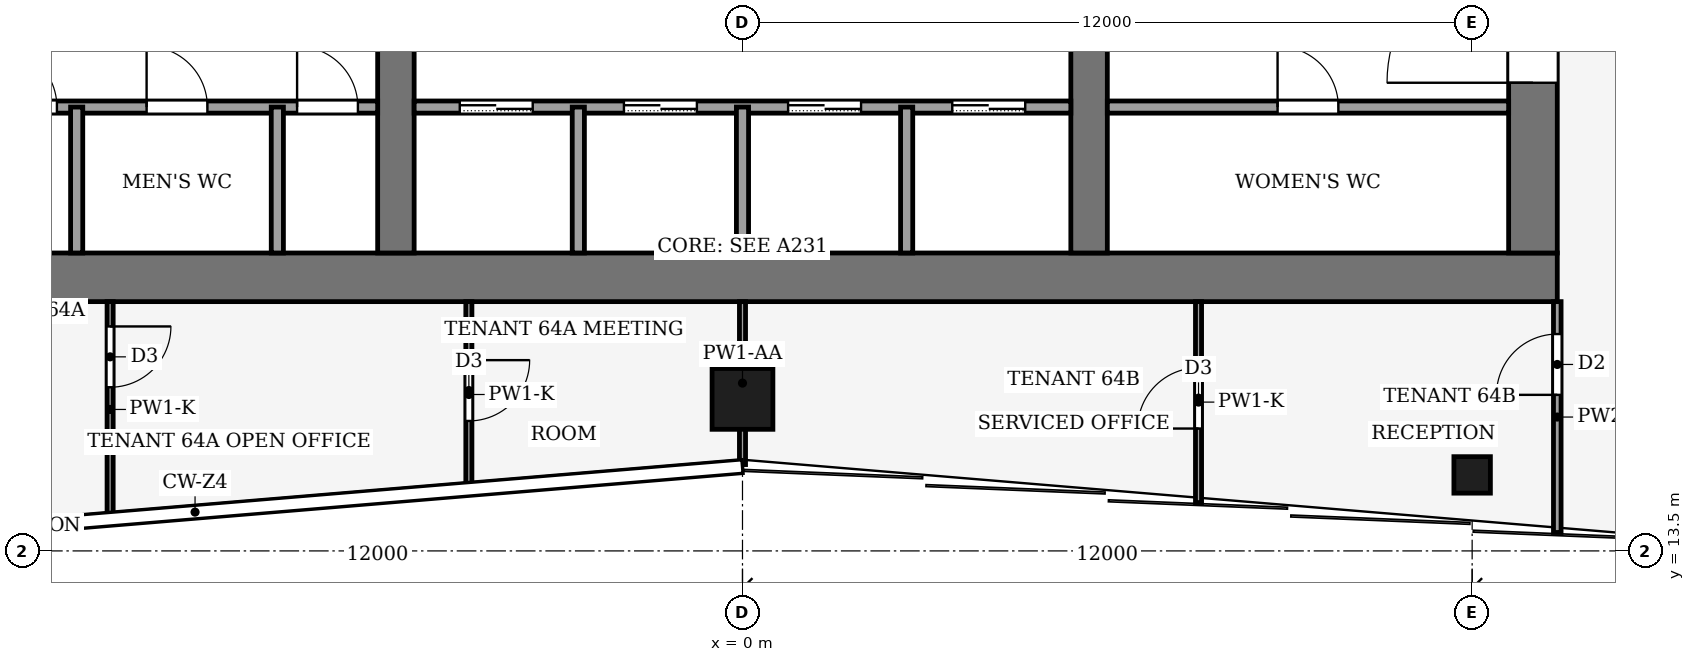
"""IFC4 building model, lengths in metres.
Left out: names, types, materials, properties, quantities, classifications, styles, units other than length and angle.
Written with IfcOpenShell. Run it as: python <this file> out.ifc"""

import sys

from ifc_helpers import new_model, si_unit, direction, frame, frame_2d, origin, origin_2d, place, context, subcontext, project, spatial, rectangle, hollow_rectangle, extrude, element, fill, save


model = new_model("IFC4")
c1 = context("Model", 3, precision=1e-05, world=origin(), true_north=direction((0.0, 1.0)))
c2 = subcontext(c1, "Body", "Model", "MODEL_VIEW")
j1 = project(units=[si_unit("LENGTHUNIT", "METRE"), si_unit("PLANEANGLEUNIT", "RADIAN")], contexts=[c1])
p1 = place(None, origin())
s1 = spatial("IfcSite", under=j1, at=p1, CompositionType="ELEMENT")
p2 = place(p1, origin())
s2 = spatial("IfcBuilding", under=s1, at=p2, CompositionType="ELEMENT")
p3 = place(p2, frame((0.0, 0.0, 278.0)))
s3 = spatial("IfcBuildingStorey", under=s2, at=p3, CompositionType="ELEMENT", Elevation=278.0)
p4 = place(p3, frame((-13.4, 18.0, -0.13), z_axis=(0.0, 0.0, 1.0), x_axis=(1.0, 0.0, 0.0)))
e1 = element("IfcWall", 1, at=p4, inside=s3, PredefinedType="SHEAR", context=c2, shape_type="SweptSolid", body=[
    extrude(rectangle(XDim=26.8, YDim=0.8, at=frame_2d((13.4, 0.0))), origin(), (0.0, 0.0, 1.0), 3.88),
])
p5 = place(p3, frame((13.0, 18.4, -0.13), z_axis=(0.0, 0.0, 1.0), x_axis=(0.0, 1.0, 0.0)))
e2 = element("IfcWall", 2, at=p5, inside=s3, PredefinedType="SHEAR", context=c2, shape_type="SweptSolid", body=[
    extrude(rectangle(XDim=19.2, YDim=0.8, at=frame_2d((9.6, 0.0))), origin(), (0.0, 0.0, 1.0), 3.88),
])
p6 = place(p5, frame((2.8, 0.0, 0.13)))
e3 = element("IfcOpeningElement", 3, at=p6, cuts=e2, PredefinedType="OPENING", context=c2, shape_type="SweptSolid", body=[
    extrude(rectangle(XDim=2.4, YDim=2.4, at=frame_2d((1.2, 1.2))), frame((0.0, 0.41, 0.0), z_axis=(0.0, -1.0, 0.0), x_axis=(1.0, 0.0, 0.0)), (0.0, 0.0, 1.0), 0.82),
])
p7 = place(p5, frame((13.3, 0.0, 0.13)))
e4 = element("IfcOpeningElement", 4, at=p7, cuts=e2, PredefinedType="OPENING", context=c2, shape_type="SweptSolid", body=[
    extrude(rectangle(XDim=2.4, YDim=2.4, at=frame_2d((1.2, 1.2))), frame((0.0, 0.41, 0.0), z_axis=(0.0, -1.0, 0.0), x_axis=(1.0, 0.0, 0.0)), (0.0, 0.0, 1.0), 0.82),
])
p8 = place(p3, frame((-5.7, 18.4, -0.13), z_axis=(0.0, 0.0, 1.0), x_axis=(0.0, 1.0, 0.0)))
e5 = element("IfcWall", 5, at=p8, inside=s3, PredefinedType="SHEAR", context=c2, shape_type="SweptSolid", body=[
    extrude(rectangle(XDim=19.2, YDim=0.6, at=frame_2d((9.6, 0.0))), origin(), (0.0, 0.0, 1.0), 3.88),
])
p9 = place(p8, frame((8.35, 0.0, 0.13)))
e6 = element("IfcOpeningElement", 6, at=p9, cuts=e5, PredefinedType="OPENING", context=c2, shape_type="SweptSolid", body=[
    extrude(rectangle(XDim=0.9, YDim=2.1, at=frame_2d((0.45, 1.05))), frame((0.0, 0.31, 0.0), z_axis=(0.0, -1.0, 0.0), x_axis=(1.0, 0.0, 0.0)), (0.0, 0.0, 1.0), 0.62),
])
p10 = place(p3, frame((5.7, 18.4, -0.13), z_axis=(0.0, 0.0, 1.0), x_axis=(0.0, 1.0, 0.0)))
e7 = element("IfcWall", 7, at=p10, inside=s3, PredefinedType="SHEAR", context=c2, shape_type="SweptSolid", body=[
    extrude(rectangle(XDim=19.2, YDim=0.6, at=frame_2d((9.6, 0.0))), origin(), (0.0, 0.0, 1.0), 3.88),
])
p11 = place(p10, frame((8.35, 0.0, 0.13)))
e8 = element("IfcOpeningElement", 8, at=p11, cuts=e7, PredefinedType="OPENING", context=c2, shape_type="SweptSolid", body=[
    extrude(rectangle(XDim=0.9, YDim=2.1, at=frame_2d((0.45, 1.05))), frame((0.0, 0.31, 0.0), z_axis=(0.0, -1.0, 0.0), x_axis=(1.0, 0.0, 0.0)), (0.0, 0.0, 1.0), 0.62),
])
p12 = place(p10, frame((13.3, 0.0, 0.13)))
e9 = element("IfcOpeningElement", 9, at=p12, cuts=e7, PredefinedType="OPENING", context=c2, shape_type="SweptSolid", body=[
    extrude(rectangle(XDim=2.4, YDim=2.4, at=frame_2d((1.2, 1.2))), frame((0.0, 0.31, 0.0), z_axis=(0.0, -1.0, 0.0), x_axis=(1.0, 0.0, 0.0)), (0.0, 0.0, 1.0), 0.62),
])
p13 = place(p3, frame((0.0, 16.0, 0.0), z_axis=(0.0, 0.0, 1.0), x_axis=(1.0, 0.0, 0.0)))
e10 = element("IfcColumn", 10, at=p13, inside=s3, PredefinedType="COLUMN", context=c2, shape_type="SweptSolid", body=[
    extrude(hollow_rectangle(XDim=1.0, YDim=1.0, WallThickness=0.045, at=origin_2d()), origin(), (0.0, 0.0, 1.0), 4.0),
])
p14 = place(p3, frame((12.0, 14.75, 0.0), z_axis=(0.0, 0.0, 1.0), x_axis=(1.0, 0.0, 0.0)))
e11 = element("IfcColumn", 11, at=p14, inside=s3, PredefinedType="COLUMN", context=c2, shape_type="SweptSolid", body=[
    extrude(hollow_rectangle(XDim=0.6, YDim=0.6, WallThickness=0.025, at=origin_2d()), origin(), (0.0, 0.0, 1.0), 4.0),
])
p15 = place(p3, frame((-12.6, 20.8, 0.0), z_axis=(0.0, 0.0, 1.0), x_axis=(1.0, 0.0, 0.0)))
e12 = element("IfcWall", 12, at=p15, inside=s3, PredefinedType="PARTITIONING", context=c2, shape_type="SweptSolid", body=[
    extrude(rectangle(XDim=6.6, YDim=0.2, at=frame_2d((3.3, 0.0))), origin(), (0.0, 0.0, 1.0), 3.75),
])
p16 = place(p15, frame((0.325, 0.0, 0.0)))
e13 = element("IfcOpeningElement", 13, at=p16, cuts=e12, PredefinedType="OPENING", context=c2, shape_type="SweptSolid", body=[
    extrude(rectangle(XDim=1.0, YDim=2.1, at=frame_2d((0.5, 1.05))), frame((0.0, 0.11, 0.0), z_axis=(0.0, -1.0, 0.0), x_axis=(1.0, 0.0, 0.0)), (0.0, 0.0, 1.0), 0.22),
])
p17 = place(p15, frame((2.8, 0.0, 0.0)))
e14 = element("IfcOpeningElement", 14, at=p17, cuts=e12, PredefinedType="OPENING", context=c2, shape_type="SweptSolid", body=[
    extrude(rectangle(XDim=1.0, YDim=2.1, at=frame_2d((0.5, 1.05))), frame((0.0, 0.11, 0.0), z_axis=(0.0, -1.0, 0.0), x_axis=(1.0, 0.0, 0.0)), (0.0, 0.0, 1.0), 0.22),
])
p18 = place(p15, frame((5.275, 0.0, 0.0)))
e15 = element("IfcOpeningElement", 15, at=p18, cuts=e12, PredefinedType="OPENING", context=c2, shape_type="SweptSolid", body=[
    extrude(rectangle(XDim=1.0, YDim=2.1, at=frame_2d((0.5, 1.05))), frame((0.0, 0.11, 0.0), z_axis=(0.0, -1.0, 0.0), x_axis=(1.0, 0.0, 0.0)), (0.0, 0.0, 1.0), 0.22),
])
p19 = place(p3, frame((-5.4, 20.8, 0.0), z_axis=(0.0, 0.0, 1.0), x_axis=(1.0, 0.0, 0.0)))
e16 = element("IfcWall", 16, at=p19, inside=s3, PredefinedType="PARTITIONING", context=c2, shape_type="SweptSolid", body=[
    extrude(rectangle(XDim=10.8, YDim=0.2, at=frame_2d((5.4, 0.0))), origin(), (0.0, 0.0, 1.0), 3.75),
])
p20 = place(p19, frame((0.75, 0.0, 0.0)))
e17 = element("IfcOpeningElement", 17, at=p20, cuts=e16, PredefinedType="OPENING", context=c2, shape_type="SweptSolid", body=[
    extrude(rectangle(XDim=1.2, YDim=2.2, at=frame_2d((0.6, 1.1))), frame((0.0, 0.11, 0.0), z_axis=(0.0, -1.0, 0.0), x_axis=(1.0, 0.0, 0.0)), (0.0, 0.0, 1.0), 0.22),
])
p21 = place(p19, frame((3.45, 0.0, 0.0)))
e18 = element("IfcOpeningElement", 18, at=p21, cuts=e16, PredefinedType="OPENING", context=c2, shape_type="SweptSolid", body=[
    extrude(rectangle(XDim=1.2, YDim=2.2, at=frame_2d((0.6, 1.1))), frame((0.0, 0.11, 0.0), z_axis=(0.0, -1.0, 0.0), x_axis=(1.0, 0.0, 0.0)), (0.0, 0.0, 1.0), 0.22),
])
p22 = place(p19, frame((6.15, 0.0, 0.0)))
e19 = element("IfcOpeningElement", 19, at=p22, cuts=e16, PredefinedType="OPENING", context=c2, shape_type="SweptSolid", body=[
    extrude(rectangle(XDim=1.2, YDim=2.2, at=frame_2d((0.6, 1.1))), frame((0.0, 0.11, 0.0), z_axis=(0.0, -1.0, 0.0), x_axis=(1.0, 0.0, 0.0)), (0.0, 0.0, 1.0), 0.22),
])
p23 = place(p19, frame((8.85, 0.0, 0.0)))
e20 = element("IfcOpeningElement", 20, at=p23, cuts=e16, PredefinedType="OPENING", context=c2, shape_type="SweptSolid", body=[
    extrude(rectangle(XDim=1.2, YDim=2.2, at=frame_2d((0.6, 1.1))), frame((0.0, 0.11, 0.0), z_axis=(0.0, -1.0, 0.0), x_axis=(1.0, 0.0, 0.0)), (0.0, 0.0, 1.0), 0.22),
])
p24 = place(p3, frame((6.0, 20.8, 0.0), z_axis=(0.0, 0.0, 1.0), x_axis=(1.0, 0.0, 0.0)))
e21 = element("IfcWall", 21, at=p24, inside=s3, PredefinedType="PARTITIONING", context=c2, shape_type="SweptSolid", body=[
    extrude(rectangle(XDim=6.6, YDim=0.2, at=frame_2d((3.3, 0.0))), origin(), (0.0, 0.0, 1.0), 3.75),
])
p25 = place(p24, frame((2.8, 0.0, 0.0)))
e22 = element("IfcOpeningElement", 22, at=p25, cuts=e21, PredefinedType="OPENING", context=c2, shape_type="SweptSolid", body=[
    extrude(rectangle(XDim=1.0, YDim=2.1, at=frame_2d((0.5, 1.05))), frame((0.0, 0.11, 0.0), z_axis=(0.0, -1.0, 0.0), x_axis=(1.0, 0.0, 0.0)), (0.0, 0.0, 1.0), 0.22),
])
for number, where, z_axis, x_axis in (
    (23, (-10.95, 18.4, 0.0), (0.0, 0.0, 1.0), (0.0, 1.0, 0.0)),
    (24, (-7.65, 18.4, 0.0), (0.0, 0.0, 1.0), (0.0, 1.0, 0.0)),
    (25, (-2.7, 18.4, 0.0), (0.0, 0.0, 1.0), (0.0, 1.0, 0.0)),
    (26, (0.0, 18.4, 0.0), (0.0, 0.0, 1.0), (0.0, 1.0, 0.0)),
    (27, (2.7, 18.4, 0.0), (0.0, 0.0, 1.0), (0.0, 1.0, 0.0)),
):
    element("IfcWall", number, at=place(p3, frame(where, z_axis=z_axis, x_axis=x_axis)), inside=s3, PredefinedType="PARTITIONING", context=c2, shape_type="SweptSolid", body=[
        extrude(rectangle(XDim=2.4, YDim=0.2, at=frame_2d((1.2, 0.0))), origin(), (0.0, 0.0, 1.0), 3.75),
    ])
p26 = place(p3, frame((13.4, 13.803, 0.0), z_axis=(0.0, 0.0, 1.0), x_axis=(0.0, 1.0, 0.0)))
e28 = element("IfcWall", 28, at=p26, inside=s3, PredefinedType="PARTITIONING", context=c2, shape_type="SweptSolid", body=[
    extrude(rectangle(XDim=3.797, YDim=0.125, at=frame_2d((1.898, 0.0))), origin(), (0.0, 0.0, 1.0), 2.92),
])
p27 = place(p26, frame((2.263, 0.0, 0.0)))
e29 = element("IfcOpeningElement", 29, at=p27, cuts=e28, PredefinedType="OPENING", context=c2, shape_type="SweptSolid", body=[
    extrude(rectangle(XDim=1.0, YDim=2.1, at=frame_2d((0.5, 1.05))), frame((0.0, 0.073, 0.0), z_axis=(0.0, -1.0, 0.0), x_axis=(1.0, 0.0, 0.0)), (0.0, 0.0, 1.0), 0.145),
])
p28 = place(p3, frame((-10.4, 17.6, 0.0), z_axis=(0.0, 0.0, 1.0), x_axis=(0.0, -1.0, 0.0)))
e30 = element("IfcWall", 30, at=p28, inside=s3, PredefinedType="PARTITIONING", context=c2, shape_type="SweptSolid", body=[
    extrude(rectangle(XDim=3.547, YDim=0.1, at=frame_2d((1.773, 0.0))), origin(), (0.0, 0.0, 1.0), 2.92),
])
p29 = place(p28, frame((0.408, 0.0, 0.0)))
e31 = element("IfcOpeningElement", 31, at=p29, cuts=e30, PredefinedType="OPENING", context=c2, shape_type="SweptSolid", body=[
    extrude(rectangle(XDim=1.0, YDim=2.1, at=frame_2d((0.5, 1.05))), frame((0.0, 0.06, 0.0), z_axis=(0.0, -1.0, 0.0), x_axis=(1.0, 0.0, 0.0)), (0.0, 0.0, 1.0), 0.12),
])
p30 = place(p3, frame((-4.5, 17.6, 0.0), z_axis=(0.0, 0.0, 1.0), x_axis=(0.0, -1.0, 0.0)))
e32 = element("IfcWall", 32, at=p30, inside=s3, PredefinedType="PARTITIONING", context=c2, shape_type="SweptSolid", body=[
    extrude(rectangle(XDim=3.055, YDim=0.1, at=frame_2d((1.528, 0.0))), origin(), (0.0, 0.0, 1.0), 2.92),
])
p31 = place(p30, frame((0.962, 0.0, 0.0)))
e33 = element("IfcOpeningElement", 33, at=p31, cuts=e32, PredefinedType="OPENING", context=c2, shape_type="SweptSolid", body=[
    extrude(rectangle(XDim=1.0, YDim=2.1, at=frame_2d((0.5, 1.05))), frame((0.0, 0.06, 0.0), z_axis=(0.0, -1.0, 0.0), x_axis=(1.0, 0.0, 0.0)), (0.0, 0.0, 1.0), 0.12),
])
p32 = place(p3, frame((0.0, 14.92, 0.0), z_axis=(0.0, 0.0, 1.0), x_axis=(0.0, 1.0, 0.0)))
e34 = element("IfcWall", 34, at=p32, inside=s3, PredefinedType="PARTITIONING", context=c2, shape_type="SweptSolid", body=[
    extrude(rectangle(XDim=2.68, YDim=0.1, at=frame_2d((1.34, 0.0))), origin(), (0.0, 0.0, 1.0), 3.42),
])
p33 = place(p3, frame((7.5, 14.295, 0.0), z_axis=(0.0, 0.0, 1.0), x_axis=(0.0, 1.0, 0.0)))
e35 = element("IfcWall", 35, at=p33, inside=s3, PredefinedType="PARTITIONING", context=c2, shape_type="SweptSolid", body=[
    extrude(rectangle(XDim=3.305, YDim=0.1, at=frame_2d((1.653, 0.0))), origin(), (0.0, 0.0, 1.0), 2.92),
])
p34 = place(p33, frame((1.218, 0.0, 0.0)))
e36 = element("IfcOpeningElement", 36, at=p34, cuts=e35, PredefinedType="OPENING", context=c2, shape_type="SweptSolid", body=[
    extrude(rectangle(XDim=1.0, YDim=2.1, at=frame_2d((0.5, 1.05))), frame((0.0, 0.06, 0.0), z_axis=(0.0, -1.0, 0.0), x_axis=(1.0, 0.0, 0.0)), (0.0, 0.0, 1.0), 0.12),
])
p35 = place(p20, origin())
e37 = element("IfcDoor", 37, at=p35, inside=s3, OperationType="SLIDING_TO_LEFT", PredefinedType="DOOR", context=c2, shape_type="SweptSolid", body=[
    extrude(rectangle(XDim=1.2, YDim=2.2, at=frame_2d((0.6, 1.1))), frame((0.0, 0.025, 0.0), z_axis=(0.0, -1.0, 0.0), x_axis=(1.0, 0.0, 0.0)), (0.0, 0.0, 1.0), 0.05),
])
fill(e17, e37)
p36 = place(p21, origin())
e38 = element("IfcDoor", 38, at=p36, inside=s3, OperationType="SLIDING_TO_LEFT", PredefinedType="DOOR", context=c2, shape_type="SweptSolid", body=[
    extrude(rectangle(XDim=1.2, YDim=2.2, at=frame_2d((0.6, 1.1))), frame((0.0, 0.025, 0.0), z_axis=(0.0, -1.0, 0.0), x_axis=(1.0, 0.0, 0.0)), (0.0, 0.0, 1.0), 0.05),
])
fill(e18, e38)
p37 = place(p22, origin())
e39 = element("IfcDoor", 39, at=p37, inside=s3, OperationType="SLIDING_TO_LEFT", PredefinedType="DOOR", context=c2, shape_type="SweptSolid", body=[
    extrude(rectangle(XDim=1.2, YDim=2.2, at=frame_2d((0.6, 1.1))), frame((0.0, 0.025, 0.0), z_axis=(0.0, -1.0, 0.0), x_axis=(1.0, 0.0, 0.0)), (0.0, 0.0, 1.0), 0.05),
])
fill(e19, e39)
p38 = place(p23, origin())
e40 = element("IfcDoor", 40, at=p38, inside=s3, OperationType="SLIDING_TO_LEFT", PredefinedType="DOOR", context=c2, shape_type="SweptSolid", body=[
    extrude(rectangle(XDim=1.2, YDim=2.2, at=frame_2d((0.6, 1.1))), frame((0.0, 0.025, 0.0), z_axis=(0.0, -1.0, 0.0), x_axis=(1.0, 0.0, 0.0)), (0.0, 0.0, 1.0), 0.05),
])
fill(e20, e40)
p39 = place(p16, origin())
e41 = element("IfcDoor", 41, at=p39, inside=s3, OperationType="SINGLE_SWING_RIGHT", PredefinedType="DOOR", context=c2, shape_type="SweptSolid", body=[
    extrude(rectangle(XDim=1.0, YDim=2.1, at=frame_2d((0.5, 1.05))), frame((0.0, 0.025, 0.0), z_axis=(0.0, -1.0, 0.0), x_axis=(1.0, 0.0, 0.0)), (0.0, 0.0, 1.0), 0.05),
])
fill(e13, e41)
p40 = place(p17, origin())
e42 = element("IfcDoor", 42, at=p40, inside=s3, OperationType="SINGLE_SWING_RIGHT", PredefinedType="DOOR", context=c2, shape_type="SweptSolid", body=[
    extrude(rectangle(XDim=1.0, YDim=2.1, at=frame_2d((0.5, 1.05))), frame((0.0, 0.025, 0.0), z_axis=(0.0, -1.0, 0.0), x_axis=(1.0, 0.0, 0.0)), (0.0, 0.0, 1.0), 0.05),
])
fill(e14, e42)
p41 = place(p18, origin())
e43 = element("IfcDoor", 43, at=p41, inside=s3, OperationType="SINGLE_SWING_RIGHT", PredefinedType="DOOR", context=c2, shape_type="SweptSolid", body=[
    extrude(rectangle(XDim=1.0, YDim=2.1, at=frame_2d((0.5, 1.05))), frame((0.0, 0.025, 0.0), z_axis=(0.0, -1.0, 0.0), x_axis=(1.0, 0.0, 0.0)), (0.0, 0.0, 1.0), 0.05),
])
fill(e15, e43)
p42 = place(p25, origin())
e44 = element("IfcDoor", 44, at=p42, inside=s3, OperationType="SINGLE_SWING_RIGHT", PredefinedType="DOOR", context=c2, shape_type="SweptSolid", body=[
    extrude(rectangle(XDim=1.0, YDim=2.1, at=frame_2d((0.5, 1.05))), frame((0.0, 0.025, 0.0), z_axis=(0.0, -1.0, 0.0), x_axis=(1.0, 0.0, 0.0)), (0.0, 0.0, 1.0), 0.05),
])
fill(e22, e44)
p43 = place(p6, origin())
e45 = element("IfcDoor", 45, at=p43, inside=s3, OperationType="DOUBLE_DOOR_SINGLE_SWING", PredefinedType="DOOR", context=c2, shape_type="SweptSolid", body=[
    extrude(rectangle(XDim=2.4, YDim=2.4, at=frame_2d((1.2, 1.2))), frame((0.0, 0.025, 0.0), z_axis=(0.0, -1.0, 0.0), x_axis=(1.0, 0.0, 0.0)), (0.0, 0.0, 1.0), 0.05),
])
fill(e3, e45)
p44 = place(p27, origin())
e46 = element("IfcDoor", 46, at=p44, inside=s3, OperationType="SINGLE_SWING_RIGHT", PredefinedType="DOOR", context=c2, shape_type="SweptSolid", body=[
    extrude(rectangle(XDim=1.0, YDim=2.1, at=frame_2d((0.5, 1.05))), frame((0.0, 0.025, 0.0), z_axis=(0.0, -1.0, 0.0), x_axis=(1.0, 0.0, 0.0)), (0.0, 0.0, 1.0), 0.05),
])
fill(e29, e46)
p45 = place(p29, origin())
e47 = element("IfcDoor", 47, at=p45, inside=s3, OperationType="SINGLE_SWING_LEFT", PredefinedType="DOOR", context=c2, shape_type="SweptSolid", body=[
    extrude(rectangle(XDim=1.0, YDim=2.1, at=frame_2d((0.5, 1.05))), frame((0.0, 0.025, 0.0), z_axis=(0.0, -1.0, 0.0), x_axis=(1.0, 0.0, 0.0)), (0.0, 0.0, 1.0), 0.05),
])
fill(e31, e47)
p46 = place(p31, origin())
e48 = element("IfcDoor", 48, at=p46, inside=s3, OperationType="SINGLE_SWING_LEFT", PredefinedType="DOOR", context=c2, shape_type="SweptSolid", body=[
    extrude(rectangle(XDim=1.0, YDim=2.1, at=frame_2d((0.5, 1.05))), frame((0.0, 0.025, 0.0), z_axis=(0.0, -1.0, 0.0), x_axis=(1.0, 0.0, 0.0)), (0.0, 0.0, 1.0), 0.05),
])
fill(e33, e48)
p47 = place(p34, origin())
e49 = element("IfcDoor", 49, at=p47, inside=s3, OperationType="SINGLE_SWING_RIGHT", PredefinedType="DOOR", context=c2, shape_type="SweptSolid", body=[
    extrude(rectangle(XDim=1.0, YDim=2.1, at=frame_2d((0.5, 1.05))), frame((0.0, 0.025, 0.0), z_axis=(0.0, -1.0, 0.0), x_axis=(1.0, 0.0, 0.0)), (0.0, 0.0, 1.0), 0.05),
])
fill(e36, e49)
save(model, sys.argv[1])
